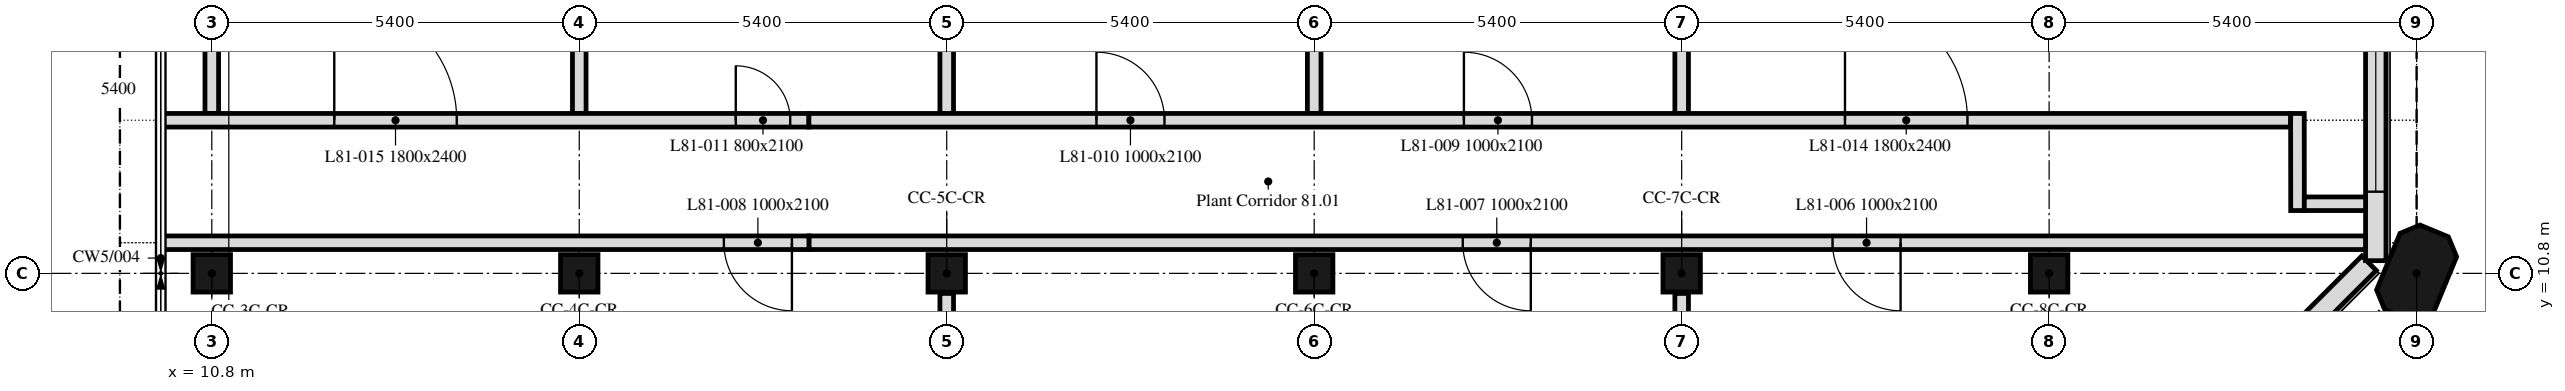
"""IFC4 building model, lengths in metres.
Left out: names, types, materials, properties, quantities, classifications, styles, units other than length and angle.
Written with IfcOpenShell. Run it as: python <this file> out.ifc"""

import sys

from ifc_helpers import new_model, si_unit, direction, frame, frame_2d, origin, origin_2d, place, context, subcontext, project, spatial, polyline, rectangle, outline, extrude, element, fill, save


model = new_model("IFC4")
c1 = context("Model", 3, precision=1e-05, world=origin(), true_north=direction((0.0, 1.0)))
c2 = subcontext(c1, "Body", "Model", "MODEL_VIEW")
j1 = project(units=[si_unit("LENGTHUNIT", "METRE"), si_unit("PLANEANGLEUNIT", "RADIAN")], contexts=[c1])
p1 = place(None, origin())
s1 = spatial("IfcSite", under=j1, at=p1, CompositionType="ELEMENT")
p2 = place(p1, origin())
s2 = spatial("IfcBuilding", under=s1, at=p2, CompositionType="ELEMENT")
p3 = place(p2, frame((0.0, 0.0, 326.2)))
s3 = spatial("IfcBuildingStorey", under=s2, at=p3, CompositionType="ELEMENT", Elevation=326.2)
p4 = place(p3, frame((10.8, 10.8, 0.0), z_axis=(0.0, 0.0, 1.0), x_axis=(1.0, 0.0, 0.0)))
e1 = element("IfcColumn", 1, at=p4, inside=s3, PredefinedType="COLUMN", context=c2, shape_type="SweptSolid", body=[
    extrude(rectangle(XDim=0.55, YDim=0.55, at=origin_2d()), origin(), (0.0, 0.0, 1.0), 3.3),
])
for number, where, z_axis, x_axis in (
    (2, (16.2, 10.8, 0.0), (0.0, 0.0, 1.0), (1.0, 0.0, 0.0)),
    (3, (21.6, 10.8, 0.0), (0.0, 0.0, 1.0), (1.0, 0.0, 0.0)),
    (4, (27.0, 10.8, 0.0), (0.0, 0.0, 1.0), (1.0, 0.0, 0.0)),
    (5, (32.4, 10.8, 0.0), (0.0, 0.0, 1.0), (1.0, 0.0, 0.0)),
    (6, (37.8, 10.8, 0.0), (0.0, 0.0, 1.0), (1.0, 0.0, 0.0)),
):
    element("IfcColumn", number, at=place(p3, frame(where, z_axis=z_axis, x_axis=x_axis)), inside=s3, PredefinedType="COLUMN", context=c2, shape_type="SweptSolid", body=[
        extrude(rectangle(XDim=0.55, YDim=0.55, at=origin_2d()), origin(), (0.0, 0.0, 1.0), 4.2),
    ])
p5 = place(p3, frame((43.2, 10.8, 0.0), z_axis=(0.0, 0.0, 1.0), x_axis=(0.382683432365, 0.923879532511, 0.0)))
e7 = element("IfcColumn", 7, at=p5, inside=s3, PredefinedType="COLUMN", context=c2, shape_type="SweptSolid", body=[
    extrude(outline(polyline([(-0.45, -0.45), (0.45, -0.45), (0.675, -0.225), (0.675, 0.225), (0.45, 0.45), (-0.45, 0.45), (-0.675, 0.225), (-0.675, -0.225), (-0.45, -0.45)])), origin(), (0.0, 0.0, 1.0), 4.2),
])
p6 = place(p3, frame((37.65, 6.099, 0.0), z_axis=(0.0, 0.0, 1.0), x_axis=(0.707106781187, 0.707106781187, 0.0)))
e8 = element("IfcWall", 8, at=p6, inside=s3, PredefinedType="SOLIDWALL", context=c2, shape_type="SweptSolid", body=[
    extrude(outline(polyline([(0.0, 0.0), (6.86, 0.0), (6.86, 4.2), (6.288, 4.2), (5.716, 4.2), (5.145, 4.2), (4.573, 4.2), (4.001, 4.2), (3.43, 4.2), (2.858, 4.2), (2.287, 4.2), (1.715, 4.2), (1.143, 4.2), (0.572, 4.2), (0.0, 4.2), (0.0, 0.0)])), frame((0.0, 0.15, 0.0), z_axis=(0.0, -1.0, 0.0), x_axis=(1.0, 0.0, 0.0)), (0.0, 0.0, 1.0), 0.3),
])
p7 = place(p3, frame((42.6, 10.986, 0.0), z_axis=(0.0, 0.0, 1.0), x_axis=(0.0, 1.0, 0.0)))
e9 = element("IfcWall", 9, at=p7, inside=s3, PredefinedType="SOLIDWALL", context=c2, shape_type="SweptSolid", body=[
    extrude(outline(polyline([(0.0, 0.0), (5.214, 0.0), (5.214, 4.2), (4.634, 4.2), (4.055, 4.2), (3.476, 4.2), (2.896, 4.2), (2.317, 4.2), (1.738, 4.2), (1.159, 4.2), (0.579, 4.2), (0.0, 4.2), (0.0, 0.0)])), frame((0.0, 0.15, 0.0), z_axis=(0.0, -1.0, 0.0), x_axis=(1.0, 0.0, 0.0)), (0.0, 0.0, 1.0), 0.3),
])
p8 = place(p7, frame((1.014, 0.0, 0.6)))
e10 = element("IfcOpeningElement", 10, at=p8, cuts=e9, PredefinedType="OPENING", context=c2, shape_type="SweptSolid", body=[
    extrude(rectangle(XDim=3.0, YDim=1.8, at=frame_2d((1.5, 0.9))), frame((0.0, 0.16, 0.0), z_axis=(0.0, -1.0, 0.0), x_axis=(1.0, 0.0, 0.0)), (0.0, 0.0, 1.0), 0.32),
])
for number, where, z_axis, x_axis in (
    (11, (32.4, 10.505, 0.0), (0.0, 0.0, 1.0), (0.0, -1.0, 0.0)),
    (12, (21.6, 10.505, 0.0), (0.0, 0.0, 1.0), (0.0, -1.0, 0.0)),
):
    element("IfcWall", number, at=place(p3, frame(where, z_axis=z_axis, x_axis=x_axis)), inside=s3, PredefinedType="PARTITIONING", context=c2, shape_type="SweptSolid", body=[
        extrude(rectangle(XDim=4.354, YDim=0.2, at=frame_2d((2.177, 0.0))), origin(), (0.0, 0.0, 1.0), 4.2),
    ])
p9 = place(p3, frame((42.449, 11.25, 0.0), z_axis=(0.0, 0.0, 1.0), x_axis=(-1.0, 0.0, 0.0)))
e13 = element("IfcWall", 13, at=p9, inside=s3, PredefinedType="PARTITIONING", context=c2, shape_type="SweptSolid", body=[
    extrude(rectangle(XDim=22.874, YDim=0.2, at=frame_2d((11.437, 0.0))), origin(), (0.0, 0.0, 1.0), 4.2),
])
p10 = place(p9, frame((6.832, 0.0, 0.0)))
e14 = element("IfcOpeningElement", 14, at=p10, cuts=e13, PredefinedType="OPENING", context=c2, shape_type="SweptSolid", body=[
    extrude(rectangle(XDim=1.0, YDim=2.1, at=frame_2d((0.5, 1.05))), frame((0.0, 0.1, 0.0), z_axis=(0.0, -1.0, 0.0), x_axis=(1.0, 0.0, 0.0)), (0.0, 0.0, 1.0), 0.2),
])
p11 = place(p9, frame((12.266, 0.0, 0.0)))
e15 = element("IfcOpeningElement", 15, at=p11, cuts=e13, PredefinedType="OPENING", context=c2, shape_type="SweptSolid", body=[
    extrude(rectangle(XDim=1.0, YDim=2.1, at=frame_2d((0.5, 1.05))), frame((0.0, 0.1, 0.0), z_axis=(0.0, -1.0, 0.0), x_axis=(1.0, 0.0, 0.0)), (0.0, 0.0, 1.0), 0.2),
])
p12 = place(p3, frame((19.575, 11.25, 0.0), z_axis=(0.0, 0.0, 1.0), x_axis=(-1.0, 0.0, 0.0)))
e16 = element("IfcWall", 16, at=p12, inside=s3, PredefinedType="PARTITIONING", context=c2, shape_type="SweptSolid", body=[
    extrude(outline(polyline([(0.0, 0.0), (9.525, 0.0), (9.525, 2.967), (0.0, 4.2), (0.0, 0.0)])), frame((0.0, 0.1, 0.0), z_axis=(0.0, -1.0, 0.0), x_axis=(1.0, 0.0, 0.0)), (0.0, 0.0, 1.0), 0.2),
])
p13 = place(p12, frame((0.25, 0.0, 0.0)))
e17 = element("IfcOpeningElement", 17, at=p13, cuts=e16, PredefinedType="OPENING", context=c2, shape_type="SweptSolid", body=[
    extrude(rectangle(XDim=1.0, YDim=2.1, at=frame_2d((0.5, 1.05))), frame((0.0, 0.1, 0.0), z_axis=(0.0, -1.0, 0.0), x_axis=(1.0, 0.0, 0.0)), (0.0, 0.0, 1.0), 0.2),
])
p14 = place(p3, frame((27.0, 15.83, 0.0), z_axis=(0.0, 0.0, 1.0), x_axis=(0.0, -1.0, 0.0)))
e18 = element("IfcWall", 18, at=p14, inside=s3, PredefinedType="PARTITIONING", context=c2, shape_type="SweptSolid", body=[
    extrude(rectangle(XDim=2.68, YDim=0.2, at=frame_2d((1.34, 0.0))), origin(), (0.0, 0.0, 1.0), 4.2),
])
p15 = place(p3, frame((32.4, 13.15, 0.0), z_axis=(0.0, 0.0, 1.0), x_axis=(0.0, 1.0, 0.0)))
e19 = element("IfcWall", 19, at=p15, inside=s3, PredefinedType="PARTITIONING", context=c2, shape_type="SweptSolid", body=[
    extrude(rectangle(XDim=3.05, YDim=0.2, at=frame_2d((1.525, 0.0))), origin(), (0.0, 0.0, 1.0), 4.2),
])
p16 = place(p3, frame((21.6, 15.83, 0.0), z_axis=(0.0, 0.0, 1.0), x_axis=(0.0, -1.0, 0.0)))
e20 = element("IfcWall", 20, at=p16, inside=s3, PredefinedType="PARTITIONING", context=c2, shape_type="SweptSolid", body=[
    extrude(rectangle(XDim=2.68, YDim=0.2, at=frame_2d((1.34, 0.0))), origin(), (0.0, 0.0, 1.0), 4.2),
])
p17 = place(p3, frame((16.2, 16.2, 0.0), z_axis=(0.0, 0.0, 1.0), x_axis=(0.0, -1.0, 0.0)))
e21 = element("IfcWall", 21, at=p17, inside=s3, PredefinedType="PARTITIONING", context=c2, shape_type="SweptSolid", body=[
    extrude(rectangle(XDim=3.05, YDim=0.2, at=frame_2d((1.525, 0.0))), origin(), (0.0, 0.0, 1.0), 5.7),
])
p18 = place(p3, frame((10.8, 16.2, 0.0), z_axis=(0.0, 0.0, 1.0), x_axis=(0.0, -1.0, 0.0)))
e22 = element("IfcWall", 22, at=p18, inside=s3, PredefinedType="PARTITIONING", context=c2, shape_type="SweptSolid", body=[
    extrude(rectangle(XDim=3.05, YDim=0.2, at=frame_2d((1.525, 0.0))), origin(), (0.0, 0.0, 1.0), 3.3),
])
p19 = place(p3, frame((10.05, 13.05, 0.0), z_axis=(0.0, 0.0, 1.0), x_axis=(1.0, 0.0, 0.0)))
e23 = element("IfcWall", 23, at=p19, inside=s3, PredefinedType="PARTITIONING", context=c2, shape_type="SweptSolid", body=[
    extrude(outline(polyline([(0.0, 0.0), (9.525, 0.0), (9.525, 4.2), (0.0, 2.967), (0.0, 0.0)])), frame((0.0, 0.1, 0.0), z_axis=(0.0, -1.0, 0.0), x_axis=(1.0, 0.0, 0.0)), (0.0, 0.0, 1.0), 0.2),
])
p20 = place(p19, frame((8.45, 0.0, 0.0)))
e24 = element("IfcOpeningElement", 24, at=p20, cuts=e23, PredefinedType="OPENING", context=c2, shape_type="SweptSolid", body=[
    extrude(rectangle(XDim=0.8, YDim=2.1, at=frame_2d((0.4, 1.05))), frame((0.0, 0.1, 0.0), z_axis=(0.0, -1.0, 0.0), x_axis=(1.0, 0.0, 0.0)), (0.0, 0.0, 1.0), 0.2),
])
p21 = place(p19, frame((2.55, 0.0, 0.0)))
e25 = element("IfcOpeningElement", 25, at=p21, cuts=e23, PredefinedType="OPENING", context=c2, shape_type="SweptSolid", body=[
    extrude(rectangle(XDim=1.8, YDim=2.4, at=frame_2d((0.9, 1.2))), frame((0.0, 0.1, 0.0), z_axis=(0.0, -1.0, 0.0), x_axis=(1.0, 0.0, 0.0)), (0.0, 0.0, 1.0), 0.2),
])
p22 = place(p3, frame((19.575, 13.05, 0.0), z_axis=(0.0, 0.0, 1.0), x_axis=(1.0, 0.0, 0.0)))
e26 = element("IfcWall", 26, at=p22, inside=s3, PredefinedType="PARTITIONING", context=c2, shape_type="SweptSolid", body=[
    extrude(rectangle(XDim=21.774, YDim=0.2, at=frame_2d((10.887, 0.0))), origin(), (0.0, 0.0, 1.0), 4.2),
])
p23 = place(p22, frame((9.625, 0.0, 0.0)))
e27 = element("IfcOpeningElement", 27, at=p23, cuts=e26, PredefinedType="OPENING", context=c2, shape_type="SweptSolid", body=[
    extrude(rectangle(XDim=1.0, YDim=2.1, at=frame_2d((0.5, 1.05))), frame((0.0, 0.1, 0.0), z_axis=(0.0, -1.0, 0.0), x_axis=(1.0, 0.0, 0.0)), (0.0, 0.0, 1.0), 0.2),
])
p24 = place(p22, frame((4.225, 0.0, 0.0)))
e28 = element("IfcOpeningElement", 28, at=p24, cuts=e26, PredefinedType="OPENING", context=c2, shape_type="SweptSolid", body=[
    extrude(rectangle(XDim=1.0, YDim=2.1, at=frame_2d((0.5, 1.05))), frame((0.0, 0.1, 0.0), z_axis=(0.0, -1.0, 0.0), x_axis=(1.0, 0.0, 0.0)), (0.0, 0.0, 1.0), 0.2),
])
p25 = place(p22, frame((15.225, 0.0, 0.0)))
e29 = element("IfcOpeningElement", 29, at=p25, cuts=e26, PredefinedType="OPENING", context=c2, shape_type="SweptSolid", body=[
    extrude(rectangle(XDim=1.8, YDim=2.4, at=frame_2d((0.9, 1.2))), frame((0.0, 0.1, 0.0), z_axis=(0.0, -1.0, 0.0), x_axis=(1.0, 0.0, 0.0)), (0.0, 0.0, 1.0), 0.2),
])
p26 = place(p3, frame((41.449, 13.15, 0.0), z_axis=(0.0, 0.0, 1.0), x_axis=(0.00085543168, -0.999999634118, 0.0)))
e30 = element("IfcWall", 30, at=p26, inside=s3, PredefinedType="PARTITIONING", context=c2, shape_type="SweptSolid", body=[
    extrude(rectangle(XDim=1.427, YDim=0.2, at=frame_2d((0.713, 0.0))), origin(), (0.0, 0.0, 1.0), 4.2),
])
p27 = place(p3, frame((41.55, 11.823, 0.0), z_axis=(0.0, 0.0, 1.0), x_axis=(1.0, 0.0, 0.0)))
e31 = element("IfcWall", 31, at=p27, inside=s3, PredefinedType="PARTITIONING", context=c2, shape_type="SweptSolid", body=[
    extrude(rectangle(XDim=0.9, YDim=0.2, at=frame_2d((0.45, 0.0))), origin(), (0.0, 0.0, 1.0), 4.2),
])
p28 = place(p8, origin())
e32 = element("IfcWindow", 32, at=p28, inside=s3, PartitioningType="SINGLE_PANEL", PredefinedType="WINDOW", context=c2, shape_type="SweptSolid", body=[
    extrude(rectangle(XDim=3.0, YDim=1.8, at=frame_2d((1.5, 0.9))), frame((0.0, 0.03, 0.0), z_axis=(0.0, -1.0, 0.0), x_axis=(1.0, 0.0, 0.0)), (0.0, 0.0, 1.0), 0.06),
])
fill(e10, e32)
p29 = place(p10, origin())
e33 = element("IfcDoor", 33, at=p29, inside=s3, OperationType="SINGLE_SWING_LEFT", PredefinedType="DOOR", context=c2, shape_type="SweptSolid", body=[
    extrude(rectangle(XDim=1.0, YDim=2.1, at=frame_2d((0.5, 1.05))), frame((0.0, 0.025, 0.0), z_axis=(0.0, -1.0, 0.0), x_axis=(1.0, 0.0, 0.0)), (0.0, 0.0, 1.0), 0.05),
])
fill(e14, e33)
p30 = place(p11, origin())
e34 = element("IfcDoor", 34, at=p30, inside=s3, OperationType="SINGLE_SWING_RIGHT", PredefinedType="DOOR", context=c2, shape_type="SweptSolid", body=[
    extrude(rectangle(XDim=1.0, YDim=2.1, at=frame_2d((0.5, 1.05))), frame((0.0, 0.025, 0.0), z_axis=(0.0, -1.0, 0.0), x_axis=(1.0, 0.0, 0.0)), (0.0, 0.0, 1.0), 0.05),
])
fill(e15, e34)
p31 = place(p13, origin())
e35 = element("IfcDoor", 35, at=p31, inside=s3, OperationType="SINGLE_SWING_RIGHT", PredefinedType="DOOR", context=c2, shape_type="SweptSolid", body=[
    extrude(rectangle(XDim=1.0, YDim=2.1, at=frame_2d((0.5, 1.05))), frame((0.0, 0.025, 0.0), z_axis=(0.0, -1.0, 0.0), x_axis=(1.0, 0.0, 0.0)), (0.0, 0.0, 1.0), 0.05),
])
fill(e17, e35)
p32 = place(p23, origin())
e36 = element("IfcDoor", 36, at=p32, inside=s3, OperationType="SINGLE_SWING_LEFT", PredefinedType="DOOR", context=c2, shape_type="SweptSolid", body=[
    extrude(rectangle(XDim=1.0, YDim=2.1, at=frame_2d((0.5, 1.05))), frame((0.0, 0.025, 0.0), z_axis=(0.0, -1.0, 0.0), x_axis=(1.0, 0.0, 0.0)), (0.0, 0.0, 1.0), 0.05),
])
fill(e27, e36)
p33 = place(p24, origin())
e37 = element("IfcDoor", 37, at=p33, inside=s3, OperationType="SINGLE_SWING_RIGHT", PredefinedType="DOOR", context=c2, shape_type="SweptSolid", body=[
    extrude(rectangle(XDim=1.0, YDim=2.1, at=frame_2d((0.5, 1.05))), frame((0.0, 0.025, 0.0), z_axis=(0.0, -1.0, 0.0), x_axis=(1.0, 0.0, 0.0)), (0.0, 0.0, 1.0), 0.05),
])
fill(e28, e37)
p34 = place(p20, origin())
e38 = element("IfcDoor", 38, at=p34, inside=s3, OperationType="SINGLE_SWING_RIGHT", PredefinedType="DOOR", context=c2, shape_type="SweptSolid", body=[
    extrude(rectangle(XDim=0.8, YDim=2.1, at=frame_2d((0.4, 1.05))), frame((0.0, 0.025, 0.0), z_axis=(0.0, -1.0, 0.0), x_axis=(1.0, 0.0, 0.0)), (0.0, 0.0, 1.0), 0.05),
])
fill(e24, e38)
p35 = place(p25, origin())
e39 = element("IfcDoor", 39, at=p35, inside=s3, OperationType="DOUBLE_DOOR_SINGLE_SWING", PredefinedType="DOOR", context=c2, shape_type="SweptSolid", body=[
    extrude(rectangle(XDim=1.8, YDim=2.4, at=frame_2d((0.9, 1.2))), frame((0.0, 0.025, 0.0), z_axis=(0.0, -1.0, 0.0), x_axis=(1.0, 0.0, 0.0)), (0.0, 0.0, 1.0), 0.05),
])
fill(e29, e39)
p36 = place(p21, origin())
e40 = element("IfcDoor", 40, at=p36, inside=s3, OperationType="DOUBLE_DOOR_SINGLE_SWING", PredefinedType="DOOR", context=c2, shape_type="SweptSolid", body=[
    extrude(rectangle(XDim=1.8, YDim=2.4, at=frame_2d((0.9, 1.2))), frame((0.0, 0.025, 0.0), z_axis=(0.0, -1.0, 0.0), x_axis=(1.0, 0.0, 0.0)), (0.0, 0.0, 1.0), 0.05),
])
fill(e25, e40)
save(model, sys.argv[1])
